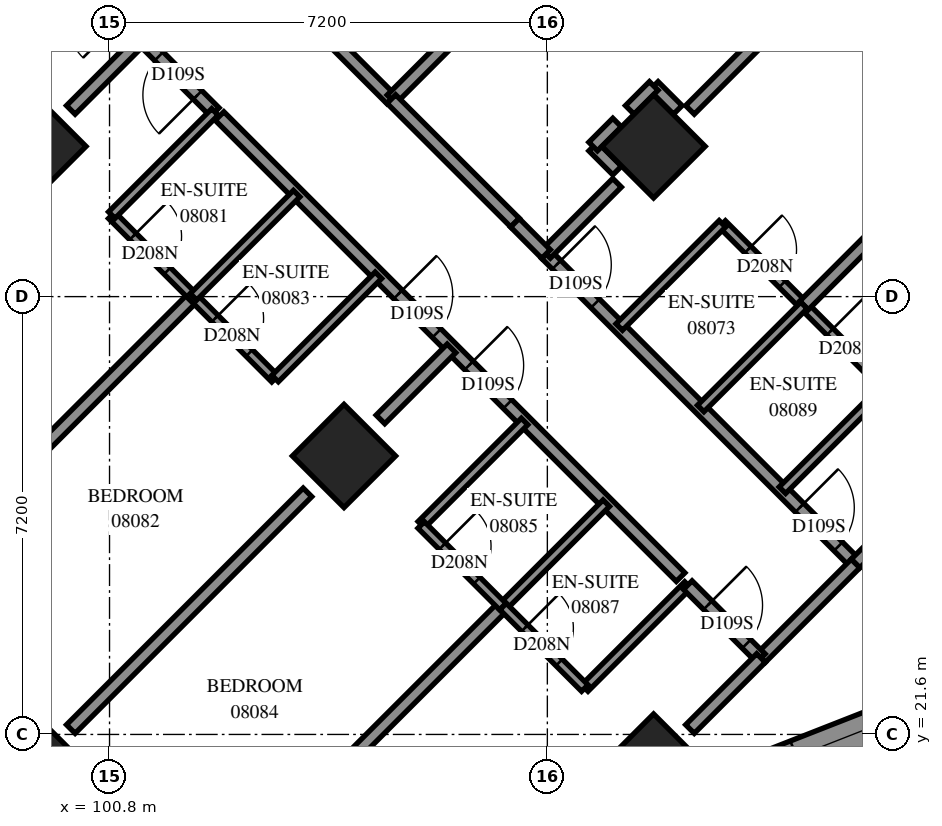
"""IFC4 building model, lengths in metres.
Left out: names, types, materials, properties, quantities, classifications, styles, units other than length and angle.
Written with IfcOpenShell. Run it as: python <this file> out.ifc"""

import sys

from ifc_helpers import new_model, si_unit, direction, frame, frame_2d, origin, origin_2d, place, context, subcontext, project, spatial, polyline, rectangle, outline, extrude, element, fill, save


model = new_model("IFC4")
c1 = context("Model", 3, precision=1e-05, world=origin(), true_north=direction((0.0, 1.0)))
c2 = subcontext(c1, "Body", "Model", "MODEL_VIEW")
j1 = project(units=[si_unit("LENGTHUNIT", "METRE"), si_unit("PLANEANGLEUNIT", "RADIAN")], contexts=[c1])
p1 = place(None, origin())
s1 = spatial("IfcSite", under=j1, at=p1, CompositionType="ELEMENT")
p2 = place(p1, origin())
s2 = spatial("IfcBuilding", under=s1, at=p2, CompositionType="ELEMENT")
p3 = place(p2, frame((0.0, 0.0, 33.8)))
s3 = spatial("IfcBuildingStorey", under=s2, at=p3, CompositionType="ELEMENT", Elevation=33.8)
for number, where, z_axis, x_axis in (
    (1, (99.565, 31.271, 0.0), (0.0, 0.0, 1.0), (0.707, -0.707, 0.0)),
    (2, (109.747, 31.271, 0.0), (0.0, 0.0, 1.0), (0.707, -0.707, 0.0)),
    (3, (104.656, 26.18, 0.0), (0.0, 0.0, 1.0), (0.707, -0.707, 0.0)),
    (4, (99.565, 21.088, 0.0), (0.0, 0.0, 1.0), (0.707, -0.707, 0.0)),
    (5, (109.747, 21.088, 0.0), (0.0, 0.0, 1.0), (0.707, -0.707, 0.0)),
):
    element("IfcColumn", number, at=place(p3, frame(where, z_axis=z_axis, x_axis=x_axis)), inside=s3, PredefinedType="COLUMN", context=c2, shape_type="SweptSolid", body=[
        extrude(rectangle(XDim=1.2, YDim=1.2, at=origin_2d()), origin(), (0.0, 0.0, 1.0), 3.1),
    ])
p4 = place(p3, frame((111.034, 20.819, 0.0), z_axis=(0.0, 0.0, 1.0), x_axis=(0.9309376522, 0.3651781589, 0.0)))
e6 = element("IfcWall", 6, at=p4, inside=s3, PredefinedType="SOLIDWALL", context=c2, shape_type="SweptSolid", body=[
    extrude(outline(polyline([(0.12, -0.275), (5.62, -0.275), (5.369, 0.275), (-0.12, 0.275), (0.12, -0.275)])), origin(), (0.0, 0.0, 1.0), 3.1),
])
p5 = place(p4, frame((1.142, 0.0, 0.5)))
e7 = element("IfcOpeningElement", 7, at=p5, cuts=e6, PredefinedType="OPENING", context=c2, shape_type="SweptSolid", body=[
    extrude(rectangle(XDim=2.8, YDim=2.45, at=frame_2d((1.4, 1.225))), frame((0.0, 0.285, 0.0), z_axis=(0.0, -1.0, 0.0), x_axis=(1.0, 0.0, 0.0)), (0.0, 0.0, 1.0), 0.57),
])
p6 = place(p3, frame((94.895, 42.581, 0.0), z_axis=(0.0, 0.0, 1.0), x_axis=(0.7071067812, -0.7071067812, 0.0)))
e8 = element("IfcWall", 8, at=p6, inside=s3, PredefinedType="PARTITIONING", context=c2, shape_type="SweptSolid", body=[
    extrude(rectangle(XDim=14.9, YDim=0.2, at=frame_2d((7.45, 0.0))), origin(), (0.0, 0.0, 1.0), 3.1),
])
p7 = place(p6, frame((2.8, 0.0, 0.0)))
e9 = element("IfcOpeningElement", 9, at=p7, cuts=e8, PredefinedType="OPENING", context=c2, shape_type="SweptSolid", body=[
    extrude(rectangle(XDim=0.9, YDim=2.1, at=frame_2d((0.45, 1.05))), frame((0.0, 0.11, 0.0), z_axis=(0.0, -1.0, 0.0), x_axis=(1.0, 0.0, 0.0)), (0.0, 0.0, 1.0), 0.22),
])
p8 = place(p6, frame((4.348, 0.0, 0.0)))
e10 = element("IfcOpeningElement", 10, at=p8, cuts=e8, PredefinedType="OPENING", context=c2, shape_type="SweptSolid", body=[
    extrude(rectangle(XDim=0.9, YDim=2.1, at=frame_2d((0.45, 1.05))), frame((0.0, 0.11, 0.0), z_axis=(0.0, -1.0, 0.0), x_axis=(1.0, 0.0, 0.0)), (0.0, 0.0, 1.0), 0.22),
])
p9 = place(p6, frame((10.073, 0.0, 0.0)))
e11 = element("IfcOpeningElement", 11, at=p9, cuts=e8, PredefinedType="OPENING", context=c2, shape_type="SweptSolid", body=[
    extrude(rectangle(XDim=1.0, YDim=2.1, at=frame_2d((0.5, 1.05))), frame((0.0, 0.11, 0.0), z_axis=(0.0, -1.0, 0.0), x_axis=(1.0, 0.0, 0.0)), (0.0, 0.0, 1.0), 0.22),
])
p10 = place(p3, frame((102.609, 31.769, 0.0), z_axis=(0.0, 0.0, 1.0), x_axis=(0.7071067812, -0.7071067812, 0.0)))
e12 = element("IfcWall", 12, at=p10, inside=s3, PredefinedType="PARTITIONING", context=c2, shape_type="SweptSolid", body=[
    extrude(rectangle(XDim=10.723, YDim=0.2, at=frame_2d((5.361, 0.0))), origin(), (0.0, 0.0, 1.0), 3.1),
])
p11 = place(p10, frame((4.15, 0.0, 0.0)))
e13 = element("IfcOpeningElement", 13, at=p11, cuts=e12, PredefinedType="OPENING", context=c2, shape_type="SweptSolid", body=[
    extrude(rectangle(XDim=0.9, YDim=2.1, at=frame_2d((0.45, 1.05))), frame((0.0, 0.11, 0.0), z_axis=(0.0, -1.0, 0.0), x_axis=(1.0, 0.0, 0.0)), (0.0, 0.0, 1.0), 0.22),
])
p12 = place(p10, frame((5.8, 0.0, 0.0)))
e14 = element("IfcOpeningElement", 14, at=p12, cuts=e12, PredefinedType="OPENING", context=c2, shape_type="SweptSolid", body=[
    extrude(rectangle(XDim=0.9, YDim=2.1, at=frame_2d((0.45, 1.05))), frame((0.0, 0.11, 0.0), z_axis=(0.0, -1.0, 0.0), x_axis=(1.0, 0.0, 0.0)), (0.0, 0.0, 1.0), 0.22),
])
p13 = place(p3, frame((105.437, 32.045, 0.0), z_axis=(0.0, 0.0, 1.0), x_axis=(0.70701308, 0.70720047, 0.0)))
e15 = element("IfcWall", 15, at=p13, inside=s3, PredefinedType="PARTITIONING", context=c2, shape_type="SweptSolid", body=[
    extrude(rectangle(XDim=10.673, YDim=0.2, at=frame_2d((5.337, 0.0))), origin(), (0.0, 0.0, 1.0), 3.1),
])
p14 = place(p3, frame((101.587, 18.028, 0.0), z_axis=(0.0, 0.0, 1.0), x_axis=(0.7072374716, 0.7069760666, 0.0)))
e16 = element("IfcWall", 16, at=p14, inside=s3, PredefinedType="PARTITIONING", context=c2, shape_type="SweptSolid", body=[
    extrude(rectangle(XDim=8.034, YDim=0.2, at=frame_2d((4.017, 0.0))), origin(), (0.0, 0.0, 1.0), 3.1),
])
p15 = place(p3, frame((96.536, 23.152, 0.0), z_axis=(0.0, 0.0, 1.0), x_axis=(0.7071067812, 0.7071067812, 0.0)))
e17 = element("IfcWall", 17, at=p15, inside=s3, PredefinedType="PARTITIONING", context=c2, shape_type="SweptSolid", body=[
    extrude(rectangle(XDim=7.983, YDim=0.2, at=frame_2d((3.991, 0.0))), origin(), (0.0, 0.0, 1.0), 3.1),
])
p16 = place(p3, frame((102.531, 31.833, 0.0), z_axis=(0.0, 0.0, 1.0), x_axis=(-0.7070095491, 0.7072039999, 0.0)))
e18 = element("IfcWall", 18, at=p16, inside=s3, PredefinedType="PARTITIONING", context=c2, shape_type="SweptSolid", body=[
    extrude(rectangle(XDim=7.2, YDim=0.2, at=frame_2d((3.6, 0.0))), origin(), (0.0, 0.0, 1.0), 3.1),
])
p17 = place(p16, frame((2.165, 0.0, 0.0)))
e19 = element("IfcOpeningElement", 19, at=p17, cuts=e18, PredefinedType="OPENING", context=c2, shape_type="SweptSolid", body=[
    extrude(rectangle(XDim=0.9, YDim=2.1, at=frame_2d((0.45, 1.05))), frame((0.0, 0.11, 0.0), z_axis=(0.0, -1.0, 0.0), x_axis=(1.0, 0.0, 0.0)), (0.0, 0.0, 1.0), 0.22),
])
p18 = place(p16, frame((0.4, 0.0, 0.0)))
e20 = element("IfcOpeningElement", 20, at=p18, cuts=e18, PredefinedType="OPENING", context=c2, shape_type="SweptSolid", body=[
    extrude(rectangle(XDim=0.9, YDim=2.1, at=frame_2d((0.45, 1.05))), frame((0.0, 0.11, 0.0), z_axis=(0.0, -1.0, 0.0), x_axis=(1.0, 0.0, 0.0)), (0.0, 0.0, 1.0), 0.22),
])
p19 = place(p3, frame((107.977, 29.499, 0.0), z_axis=(0.0, 0.0, 1.0), x_axis=(0.7071067812, -0.7071067812, 0.0)))
e21 = element("IfcWall", 21, at=p19, inside=s3, PredefinedType="PARTITIONING", context=c2, shape_type="SweptSolid", body=[
    extrude(rectangle(XDim=7.198, YDim=0.2, at=frame_2d((3.599, 0.0))), origin(), (0.0, 0.0, 1.0), 3.1),
])
p20 = place(p19, frame((0.247, 0.0, 0.0)))
e22 = element("IfcOpeningElement", 22, at=p20, cuts=e21, PredefinedType="OPENING", context=c2, shape_type="SweptSolid", body=[
    extrude(rectangle(XDim=0.9, YDim=2.1, at=frame_2d((0.45, 1.05))), frame((0.0, 0.11, 0.0), z_axis=(0.0, -1.0, 0.0), x_axis=(1.0, 0.0, 0.0)), (0.0, 0.0, 1.0), 0.22),
])
p21 = place(p19, frame((5.899, 0.0, 0.0)))
e23 = element("IfcOpeningElement", 23, at=p21, cuts=e21, PredefinedType="OPENING", context=c2, shape_type="SweptSolid", body=[
    extrude(rectangle(XDim=0.9, YDim=2.1, at=frame_2d((0.45, 1.05))), frame((0.0, 0.11, 0.0), z_axis=(0.0, -1.0, 0.0), x_axis=(1.0, 0.0, 0.0)), (0.0, 0.0, 1.0), 0.22),
])
for number, where, z_axis, x_axis in (
    (24, (110.345, 31.871, 0.0), (0.0, 0.0, 1.0), (0.707, 0.707, 0.0)),
    (25, (100.163, 21.689, 0.0), (0.0, 0.0, 1.0), (0.707, 0.707, 0.0)),
):
    element("IfcWall", number, at=place(p3, frame(where, z_axis=z_axis, x_axis=x_axis)), inside=s3, PredefinedType="PARTITIONING", context=c2, shape_type="SweptSolid", body=[
        extrude(rectangle(XDim=5.504, YDim=0.2, at=frame_2d((2.752, 0.0))), origin(), (0.0, 0.0, 1.0), 3.1),
    ])
p22 = place(p3, frame((110.875, 29.995, 0.0), z_axis=(0.0, 0.0, 1.0), x_axis=(0.7071067812, -0.7071067812, 0.0)))
e26 = element("IfcWall", 26, at=p22, inside=s3, PredefinedType="PARTITIONING", context=c2, shape_type="SweptSolid", body=[
    extrude(rectangle(XDim=3.801, YDim=0.15, at=frame_2d((1.901, 0.0))), origin(), (0.0, 0.0, 1.0), 3.1),
])
p23 = place(p22, frame((0.598, 0.0, 0.0)))
e27 = element("IfcOpeningElement", 27, at=p23, cuts=e26, PredefinedType="OPENING", context=c2, shape_type="SweptSolid", body=[
    extrude(rectangle(XDim=0.8, YDim=2.1, at=frame_2d((0.4, 1.05))), frame((0.0, 0.085, 0.0), z_axis=(0.0, -1.0, 0.0), x_axis=(1.0, 0.0, 0.0)), (0.0, 0.0, 1.0), 0.17),
])
p24 = place(p22, frame((2.507, 0.0, 0.0)))
e28 = element("IfcOpeningElement", 28, at=p24, cuts=e26, PredefinedType="OPENING", context=c2, shape_type="SweptSolid", body=[
    extrude(rectangle(XDim=0.8, YDim=2.1, at=frame_2d((0.4, 1.05))), frame((0.0, 0.085, 0.0), z_axis=(0.0, -1.0, 0.0), x_axis=(1.0, 0.0, 0.0)), (0.0, 0.0, 1.0), 0.17),
])
p25 = place(p3, frame((100.836, 30.138, 0.0), z_axis=(0.0, 0.0, 1.0), x_axis=(0.7065802685, -0.7076329021, 0.0)))
e29 = element("IfcWall", 29, at=p25, inside=s3, PredefinedType="PARTITIONING", context=c2, shape_type="SweptSolid", body=[
    extrude(rectangle(XDim=3.8, YDim=0.15, at=frame_2d((1.9, 0.0))), origin(), (0.0, 0.0, 1.0), 3.1),
])
p26 = place(p25, frame((0.493, 0.0, 0.0)))
e30 = element("IfcOpeningElement", 30, at=p26, cuts=e29, PredefinedType="OPENING", context=c2, shape_type="SweptSolid", body=[
    extrude(rectangle(XDim=0.8, YDim=2.1, at=frame_2d((0.4, 1.05))), frame((0.0, 0.085, 0.0), z_axis=(0.0, -1.0, 0.0), x_axis=(1.0, 0.0, 0.0)), (0.0, 0.0, 1.0), 0.17),
])
p27 = place(p25, frame((2.402, 0.0, 0.0)))
e31 = element("IfcOpeningElement", 31, at=p27, cuts=e29, PredefinedType="OPENING", context=c2, shape_type="SweptSolid", body=[
    extrude(rectangle(XDim=0.8, YDim=2.1, at=frame_2d((0.4, 1.05))), frame((0.0, 0.085, 0.0), z_axis=(0.0, -1.0, 0.0), x_axis=(1.0, 0.0, 0.0)), (0.0, 0.0, 1.0), 0.17),
])
p28 = place(p3, frame((112.221, 28.655, 0.0), z_axis=(0.0, 0.0, 1.0), x_axis=(0.7071067812, 0.7071067812, 0.0)))
e32 = element("IfcWall", 32, at=p28, inside=s3, PredefinedType="PARTITIONING", context=c2, shape_type="SweptSolid", body=[
    extrude(rectangle(XDim=3.15, YDim=0.2, at=frame_2d((1.575, 0.0))), origin(), (0.0, 0.0, 1.0), 3.1),
])
p29 = place(p3, frame((105.435, 32.049, 0.0), z_axis=(0.0, 0.0, 1.0), x_axis=(0.7074545101, -0.7067588812, 0.0)))
e33 = element("IfcWall", 33, at=p29, inside=s3, PredefinedType="PARTITIONING", context=c2, shape_type="SweptSolid", body=[
    extrude(rectangle(XDim=2.875, YDim=0.2, at=frame_2d((1.438, 0.0))), origin(), (0.0, 0.0, 1.0), 3.1),
])
for number, where, z_axis, x_axis in (
    (34, (103.523, 27.453, 0.0), (0.0, 0.0, 1.0), (0.707, 0.707, 0.0)),
    (35, (105.927, 25.049, 0.0), (0.0, 0.0, 1.0), (0.707, 0.707, 0.0)),
    (36, (107.271, 23.705, 0.0), (0.0, 0.0, 1.0), (0.707, 0.707, 0.0)),
):
    element("IfcWall", number, at=place(p3, frame(where, z_axis=z_axis, x_axis=x_axis)), inside=s3, PredefinedType="PARTITIONING", context=c2, shape_type="SweptSolid", body=[
        extrude(rectangle(XDim=2.401, YDim=0.15, at=frame_2d((1.201, 0.0))), origin(), (0.0, 0.0, 1.0), 3.1),
    ])
for number, where, z_axis, x_axis in (
    (37, (109.182, 28.3, 0.0), (0.0, 0.0, 1.0), (0.707, 0.708, 0.0)),
    (38, (111.865, 25.616, 0.0), (0.0, 0.0, 1.0), (0.708, 0.707, 0.0)),
    (39, (110.522, 26.96, 0.0), (0.0, 0.0, 1.0), (0.708, 0.707, 0.0)),
):
    element("IfcWall", number, at=place(p3, frame(where, z_axis=z_axis, x_axis=x_axis)), inside=s3, PredefinedType="PARTITIONING", context=c2, shape_type="SweptSolid", body=[
        extrude(rectangle(XDim=2.4, YDim=0.15, at=frame_2d((1.2, 0.0))), origin(), (0.0, 0.0, 1.0), 3.1),
    ])
for number, where, z_axis, x_axis in (
    (40, (100.837, 30.141, 0.0), (0.0, 0.0, 1.0), (0.707, 0.707, 0.0)),
    (41, (108.615, 22.363, 0.0), (0.0, 0.0, 1.0), (0.707, 0.707, 0.0)),
    (42, (98.433, 32.545, 0.0), (0.0, 0.0, 1.0), (0.707, 0.707, 0.0)),
    (43, (102.181, 28.797, 0.0), (0.0, 0.0, 1.0), (0.707, 0.707, 0.0)),
):
    element("IfcWall", number, at=place(p3, frame(where, z_axis=z_axis, x_axis=x_axis)), inside=s3, PredefinedType="PARTITIONING", context=c2, shape_type="SweptSolid", body=[
        extrude(rectangle(XDim=2.398, YDim=0.15, at=frame_2d((1.199, 0.0))), origin(), (0.0, 0.0, 1.0), 3.1),
    ])
p30 = place(p3, frame((111.513, 22.857, 0.0), z_axis=(0.0, 0.0, 1.0), x_axis=(0.7071067812, 0.7071067812, 0.0)))
e44 = element("IfcWall", 44, at=p30, inside=s3, PredefinedType="PARTITIONING", context=c2, shape_type="SweptSolid", body=[
    extrude(rectangle(XDim=2.2, YDim=0.2, at=frame_2d((1.1, 0.0))), origin(), (0.0, 0.0, 1.0), 2.6),
])
p31 = place(p3, frame((105.925, 25.045, 0.0), z_axis=(0.0, 0.0, 1.0), x_axis=(0.7071067812, -0.7071067812, 0.0)))
e45 = element("IfcWall", 45, at=p31, inside=s3, PredefinedType="PARTITIONING", context=c2, shape_type="SweptSolid", body=[
    extrude(rectangle(XDim=1.901, YDim=0.15, at=frame_2d((0.95, 0.0))), origin(), (0.0, 0.0, 1.0), 3.1),
])
p32 = place(p31, frame((0.493, 0.0, 0.0)))
e46 = element("IfcOpeningElement", 46, at=p32, cuts=e45, PredefinedType="OPENING", context=c2, shape_type="SweptSolid", body=[
    extrude(rectangle(XDim=0.8, YDim=2.1, at=frame_2d((0.4, 1.05))), frame((0.0, 0.085, 0.0), z_axis=(0.0, -1.0, 0.0), x_axis=(1.0, 0.0, 0.0)), (0.0, 0.0, 1.0), 0.17),
])
p33 = place(p3, frame((107.272, 23.704, 0.0), z_axis=(0.0, 0.0, 1.0), x_axis=(0.7076330979, -0.7065800724, 0.0)))
e47 = element("IfcWall", 47, at=p33, inside=s3, PredefinedType="PARTITIONING", context=c2, shape_type="SweptSolid", body=[
    extrude(rectangle(XDim=1.899, YDim=0.15, at=frame_2d((0.95, 0.0))), origin(), (0.0, 0.0, 1.0), 3.1),
])
p34 = place(p33, frame((0.503, 0.0, 0.0)))
e48 = element("IfcOpeningElement", 48, at=p34, cuts=e47, PredefinedType="OPENING", context=c2, shape_type="SweptSolid", body=[
    extrude(rectangle(XDim=0.8, YDim=2.1, at=frame_2d((0.4, 1.05))), frame((0.0, 0.085, 0.0), z_axis=(0.0, -1.0, 0.0), x_axis=(1.0, 0.0, 0.0)), (0.0, 0.0, 1.0), 0.17),
])
p35 = place(p3, frame((110.309, 24.055, 0.0), z_axis=(0.0, 0.0, 1.0), x_axis=(0.7071067812, -0.7071067812, 0.0)))
e49 = element("IfcWall", 49, at=p35, inside=s3, PredefinedType="PARTITIONING", context=c2, shape_type="SweptSolid", body=[
    extrude(rectangle(XDim=1.7, YDim=0.2, at=frame_2d((0.85, 0.0))), origin(), (0.0, 0.0, 1.0), 3.1),
])
p36 = place(p35, frame((0.467, 0.0, 0.0)))
e50 = element("IfcOpeningElement", 50, at=p36, cuts=e49, PredefinedType="OPENING", context=c2, shape_type="SweptSolid", body=[
    extrude(rectangle(XDim=0.9, YDim=2.1, at=frame_2d((0.45, 1.05))), frame((0.0, 0.11, 0.0), z_axis=(0.0, -1.0, 0.0), x_axis=(1.0, 0.0, 0.0)), (0.0, 0.0, 1.0), 0.22),
])
for number, where, z_axis, x_axis in (
    (51, (105.255, 26.781, 0.0), (0.0, 0.0, 1.0), (0.707, 0.707, 0.0)),
    (52, (100.163, 31.871, 0.0), (0.0, 0.0, 1.0), (0.707, 0.707, 0.0)),
):
    element("IfcWall", number, at=place(p3, frame(where, z_axis=z_axis, x_axis=x_axis)), inside=s3, PredefinedType="PARTITIONING", context=c2, shape_type="SweptSolid", body=[
        extrude(rectangle(XDim=1.652, YDim=0.2, at=frame_2d((0.826, 0.0))), origin(), (0.0, 0.0, 1.0), 3.1),
    ])
for number, where, z_axis, x_axis in (
    (53, (110.346, 21.689, 0.0), (0.0, 0.0, 1.0), (0.707, 0.707, 0.0)),
    (54, (113.07, 24.413, 0.0), (0.0, 0.0, 1.0), (0.707, 0.707, 0.0)),
):
    element("IfcWall", number, at=place(p3, frame(where, z_axis=z_axis, x_axis=x_axis)), inside=s3, PredefinedType="PARTITIONING", context=c2, shape_type="SweptSolid", body=[
        extrude(rectangle(XDim=1.652, YDim=0.2, at=frame_2d((0.826, 0.0))), origin(), (0.0, 0.0, 1.0), 2.6),
    ])
p37 = place(p3, frame((107.978, 29.504, 0.0), z_axis=(0.0, 0.0, 1.0), x_axis=(0.7071067812, 0.7071067812, 0.0)))
e55 = element("IfcWall", 55, at=p37, inside=s3, PredefinedType="PARTITIONING", context=c2, shape_type="SweptSolid", body=[
    extrude(rectangle(XDim=1.652, YDim=0.2, at=frame_2d((0.826, 0.0))), origin(), (0.0, 0.0, 1.0), 3.1),
])
p38 = place(p3, frame((107.466, 30.014, 0.0), z_axis=(0.0, 0.0, 1.0), x_axis=(0.7057270646, -0.7084838109, 0.0)))
e56 = element("IfcWall", 56, at=p38, inside=s3, PredefinedType="PARTITIONING", context=c2, shape_type="SweptSolid", body=[
    extrude(rectangle(XDim=0.726, YDim=0.2, at=frame_2d((0.363, 0.0))), origin(), (0.0, 0.0, 1.0), 3.1),
])
for number, where, z_axis, x_axis in (
    (57, (108.754, 31.268, 0.0), (0.0, 0.0, 1.0), (0.707, -0.707, 0.0)),
    (58, (109.751, 32.265, 0.0), (0.0, 0.0, 1.0), (0.707, -0.707, 0.0)),
    (59, (109.355, 31.871, 0.0), (0.0, 0.0, 1.0), (0.707, 0.707, 0.0)),
    (60, (108.753, 31.269, 0.0), (0.0, 0.0, 1.0), (0.707, 0.707, 0.0)),
):
    element("IfcWall", number, at=place(p3, frame(where, z_axis=z_axis, x_axis=x_axis)), inside=s3, PredefinedType="PARTITIONING", context=c2, shape_type="SweptSolid", body=[
        extrude(rectangle(XDim=0.557, YDim=0.2, at=frame_2d((0.279, 0.0))), origin(), (0.0, 0.0, 1.0), 3.1),
    ])
p39 = place(p5, origin())
e61 = element("IfcWindow", 61, at=p39, inside=s3, PartitioningType="SINGLE_PANEL", PredefinedType="WINDOW", context=c2, shape_type="SweptSolid", body=[
    extrude(rectangle(XDim=2.8, YDim=2.45, at=frame_2d((1.4, 1.225))), frame((0.0, 0.155, 0.0), z_axis=(0.0, -1.0, 0.0), x_axis=(1.0, 0.0, 0.0)), (0.0, 0.0, 1.0), 0.06),
])
fill(e7, e61)
p40 = place(p20, origin())
e62 = element("IfcDoor", 62, at=p40, inside=s3, OperationType="SINGLE_SWING_LEFT", PredefinedType="DOOR", context=c2, shape_type="SweptSolid", body=[
    extrude(rectangle(XDim=0.9, YDim=2.1, at=frame_2d((0.45, 1.05))), frame((0.0, 0.025, 0.0), z_axis=(0.0, -1.0, 0.0), x_axis=(1.0, 0.0, 0.0)), (0.0, 0.0, 1.0), 0.05),
])
fill(e22, e62)
p41 = place(p23, origin())
e63 = element("IfcDoor", 63, at=p41, inside=s3, OperationType="SINGLE_SWING_RIGHT", PredefinedType="DOOR", context=c2, shape_type="SweptSolid", body=[
    extrude(rectangle(XDim=0.8, YDim=2.1, at=frame_2d((0.4, 1.05))), frame((0.0, 0.025, 0.0), z_axis=(0.0, -1.0, 0.0), x_axis=(1.0, 0.0, 0.0)), (0.0, 0.0, 1.0), 0.05),
])
fill(e27, e63)
p42 = place(p18, origin())
e64 = element("IfcDoor", 64, at=p42, inside=s3, OperationType="SINGLE_SWING_RIGHT", PredefinedType="DOOR", context=c2, shape_type="SweptSolid", body=[
    extrude(rectangle(XDim=0.9, YDim=2.1, at=frame_2d((0.45, 1.05))), frame((0.0, 0.025, 0.0), z_axis=(0.0, -1.0, 0.0), x_axis=(1.0, 0.0, 0.0)), (0.0, 0.0, 1.0), 0.05),
])
fill(e20, e64)
p43 = place(p26, origin())
e65 = element("IfcDoor", 65, at=p43, inside=s3, OperationType="SINGLE_SWING_RIGHT", PredefinedType="DOOR", context=c2, shape_type="SweptSolid", body=[
    extrude(rectangle(XDim=0.8, YDim=2.1, at=frame_2d((0.4, 1.05))), frame((0.0, 0.025, 0.0), z_axis=(0.0, -1.0, 0.0), x_axis=(1.0, 0.0, 0.0)), (0.0, 0.0, 1.0), 0.05),
])
fill(e30, e65)
p44 = place(p11, origin())
e66 = element("IfcDoor", 66, at=p44, inside=s3, OperationType="SINGLE_SWING_LEFT", PredefinedType="DOOR", context=c2, shape_type="SweptSolid", body=[
    extrude(rectangle(XDim=0.9, YDim=2.1, at=frame_2d((0.45, 1.05))), frame((0.0, 0.025, 0.0), z_axis=(0.0, -1.0, 0.0), x_axis=(1.0, 0.0, 0.0)), (0.0, 0.0, 1.0), 0.05),
])
fill(e13, e66)
p45 = place(p27, origin())
e67 = element("IfcDoor", 67, at=p45, inside=s3, OperationType="SINGLE_SWING_RIGHT", PredefinedType="DOOR", context=c2, shape_type="SweptSolid", body=[
    extrude(rectangle(XDim=0.8, YDim=2.1, at=frame_2d((0.4, 1.05))), frame((0.0, 0.025, 0.0), z_axis=(0.0, -1.0, 0.0), x_axis=(1.0, 0.0, 0.0)), (0.0, 0.0, 1.0), 0.05),
])
fill(e31, e67)
p46 = place(p12, origin())
e68 = element("IfcDoor", 68, at=p46, inside=s3, OperationType="SINGLE_SWING_RIGHT", PredefinedType="DOOR", context=c2, shape_type="SweptSolid", body=[
    extrude(rectangle(XDim=0.9, YDim=2.1, at=frame_2d((0.45, 1.05))), frame((0.0, 0.025, 0.0), z_axis=(0.0, -1.0, 0.0), x_axis=(1.0, 0.0, 0.0)), (0.0, 0.0, 1.0), 0.05),
])
fill(e14, e68)
p47 = place(p32, origin())
e69 = element("IfcDoor", 69, at=p47, inside=s3, OperationType="SINGLE_SWING_RIGHT", PredefinedType="DOOR", context=c2, shape_type="SweptSolid", body=[
    extrude(rectangle(XDim=0.8, YDim=2.1, at=frame_2d((0.4, 1.05))), frame((0.0, 0.025, 0.0), z_axis=(0.0, -1.0, 0.0), x_axis=(1.0, 0.0, 0.0)), (0.0, 0.0, 1.0), 0.05),
])
fill(e46, e69)
p48 = place(p36, origin())
e70 = element("IfcDoor", 70, at=p48, inside=s3, OperationType="SINGLE_SWING_LEFT", PredefinedType="DOOR", context=c2, shape_type="SweptSolid", body=[
    extrude(rectangle(XDim=0.9, YDim=2.1, at=frame_2d((0.45, 1.05))), frame((0.0, 0.025, 0.0), z_axis=(0.0, -1.0, 0.0), x_axis=(1.0, 0.0, 0.0)), (0.0, 0.0, 1.0), 0.05),
])
fill(e50, e70)
p49 = place(p34, origin())
e71 = element("IfcDoor", 71, at=p49, inside=s3, OperationType="SINGLE_SWING_RIGHT", PredefinedType="DOOR", context=c2, shape_type="SweptSolid", body=[
    extrude(rectangle(XDim=0.8, YDim=2.1, at=frame_2d((0.4, 1.05))), frame((0.0, 0.025, 0.0), z_axis=(0.0, -1.0, 0.0), x_axis=(1.0, 0.0, 0.0)), (0.0, 0.0, 1.0), 0.05),
])
fill(e48, e71)
p50 = place(p21, origin())
e72 = element("IfcDoor", 72, at=p50, inside=s3, OperationType="SINGLE_SWING_RIGHT", PredefinedType="DOOR", context=c2, shape_type="SweptSolid", body=[
    extrude(rectangle(XDim=0.9, YDim=2.1, at=frame_2d((0.45, 1.05))), frame((0.0, 0.025, 0.0), z_axis=(0.0, -1.0, 0.0), x_axis=(1.0, 0.0, 0.0)), (0.0, 0.0, 1.0), 0.05),
])
fill(e23, e72)
p51 = place(p24, origin())
e73 = element("IfcDoor", 73, at=p51, inside=s3, OperationType="SINGLE_SWING_RIGHT", PredefinedType="DOOR", context=c2, shape_type="SweptSolid", body=[
    extrude(rectangle(XDim=0.8, YDim=2.1, at=frame_2d((0.4, 1.05))), frame((0.0, 0.025, 0.0), z_axis=(0.0, -1.0, 0.0), x_axis=(1.0, 0.0, 0.0)), (0.0, 0.0, 1.0), 0.05),
])
fill(e28, e73)
save(model, sys.argv[1])
